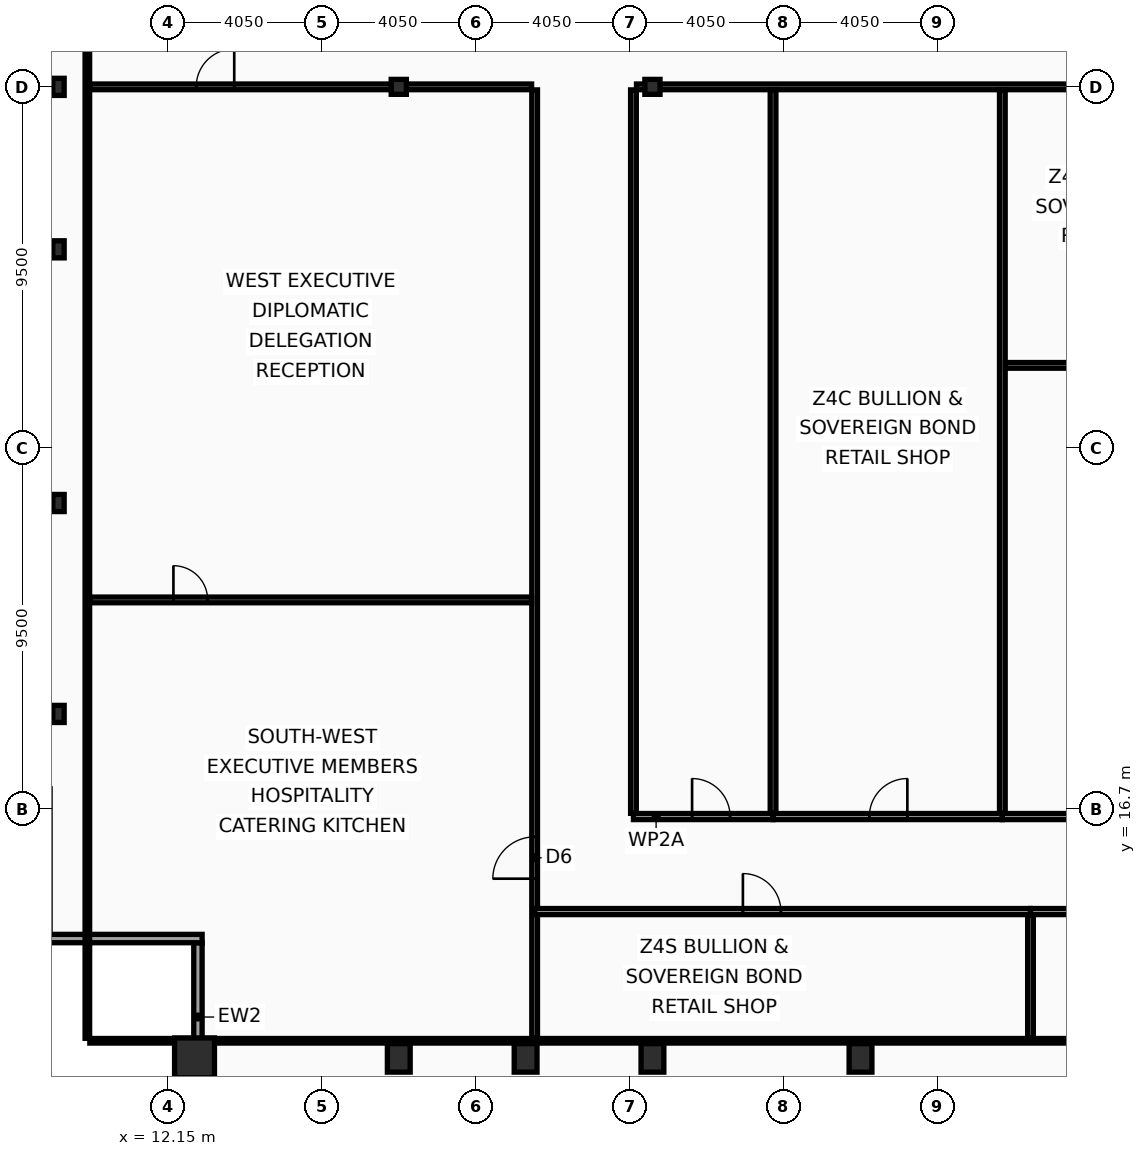
"""IFC4 building model, lengths in metres.
Left out: names, types, materials, properties, quantities, classifications, styles, units other than length and angle.
Written with IfcOpenShell. Run it as: python <this file> out.ifc"""

import sys

from ifc_helpers import new_model, si_unit, direction, frame, frame_2d, origin, origin_2d, place, context, subcontext, project, spatial, rectangle, hollow_rectangle, i_section, extrude, element, fill, save


model = new_model("IFC4")
c1 = context("Model", 3, precision=1e-05, world=origin(), true_north=direction((0.0, 1.0)))
c2 = subcontext(c1, "Body", "Model", "MODEL_VIEW")
j1 = project(units=[si_unit("LENGTHUNIT", "METRE"), si_unit("PLANEANGLEUNIT", "RADIAN")], contexts=[c1])
p1 = place(None, origin())
s1 = spatial("IfcSite", under=j1, at=p1, CompositionType="ELEMENT")
p2 = place(p1, origin())
s2 = spatial("IfcBuilding", under=s1, at=p2, CompositionType="ELEMENT")
p3 = place(p2, frame((0.0, 0.0, 273.4)))
s3 = spatial("IfcBuildingStorey", under=s2, at=p3, CompositionType="ELEMENT", Elevation=273.4)
p4 = place(p3, frame((12.85, 10.15, 0.0), z_axis=(0.0, 0.0, 1.0), x_axis=(1.0, 0.0, 0.0)))
e1 = element("IfcColumn", 1, at=p4, inside=s3, PredefinedType="COLUMN", context=c2, shape_type="SweptSolid", body=[
    extrude(hollow_rectangle(XDim=1.05, YDim=1.05, WallThickness=0.055, at=origin_2d()), origin(), (0.0, 0.0, 1.0), 3.6),
])
for number, where, z_axis, x_axis in (
    (2, (18.225, 10.15, 0.0), (0.0, 0.0, 1.0), (1.0, 0.0, 0.0)),
    (3, (21.562, 10.15, 0.0), (0.0, 0.0, 1.0), (1.0, 0.0, 0.0)),
    (4, (24.9, 10.15, 0.0), (0.0, 0.0, 1.0), (1.0, 0.0, 0.0)),
    (5, (30.375, 10.15, 0.0), (0.0, 0.0, 1.0), (1.0, 0.0, 0.0)),
):
    element("IfcColumn", number, at=place(p3, frame(where, z_axis=z_axis, x_axis=x_axis)), inside=s3, PredefinedType="COLUMN", context=c2, shape_type="SweptSolid", body=[
        extrude(hollow_rectangle(XDim=0.6, YDim=0.75, WallThickness=0.045, at=origin_2d()), origin(), (0.0, 0.0, 1.0), 3.6),
    ])
for number, where, z_axis, x_axis in (
    (6, (9.27, 19.2, 0.0), (0.0, 0.0, 1.0), (1.0, 0.0, 0.0)),
    (7, (9.27, 24.75, 0.0), (0.0, 0.0, 1.0), (1.0, 0.0, 0.0)),
    (8, (9.27, 31.425, 0.0), (0.0, 0.0, 1.0), (1.0, 0.0, 0.0)),
    (9, (9.27, 35.7, 0.0), (0.0, 0.0, 1.0), (1.0, 0.0, 0.0)),
):
    element("IfcColumn", number, at=place(p3, frame(where, z_axis=z_axis, x_axis=x_axis)), inside=s3, PredefinedType="COLUMN", context=c2, shape_type="SweptSolid", body=[
        extrude(i_section(OverallWidth=0.3, OverallDepth=0.45, WebThickness=0.014, FlangeThickness=0.026, at=origin_2d()), origin(), (0.0, 0.0, 1.0), 3.6),
    ])
for number, where, z_axis, x_axis in (
    (10, (18.225, 35.7, 0.0), (0.0, 0.0, 1.0), (1.0, 0.0, 0.0)),
    (11, (24.9, 35.7, 0.0), (0.0, 0.0, 1.0), (1.0, 0.0, 0.0)),
):
    element("IfcColumn", number, at=place(p3, frame(where, z_axis=z_axis, x_axis=x_axis)), inside=s3, PredefinedType="COLUMN", context=c2, shape_type="SweptSolid", body=[
        extrude(i_section(OverallWidth=0.399, OverallDepth=0.393, WebThickness=0.023, FlangeThickness=0.037, at=origin_2d()), origin(), (0.0, 0.0, 1.0), 3.6),
    ])
p5 = place(p3, frame((12.94, 9.27, 0.0), z_axis=(0.0, 0.0, 1.0), x_axis=(0.0, 1.0, 0.0)))
e12 = element("IfcWall", 12, at=p5, inside=s3, PredefinedType="SOLIDWALL", context=c2, shape_type="SweptSolid", body=[
    extrude(rectangle(XDim=3.91, YDim=0.22, at=frame_2d((1.955, 0.0))), origin(), (0.0, 0.0, 1.0), 2.88),
])
p6 = place(p3, frame((13.05, 13.29, 0.0), z_axis=(0.0, 0.0, 1.0), x_axis=(-1.0, 0.0, 0.0)))
e13 = element("IfcWall", 13, at=p6, inside=s3, PredefinedType="SOLIDWALL", context=c2, shape_type="SweptSolid", body=[
    extrude(rectangle(XDim=4.22, YDim=0.22, at=frame_2d((2.11, 0.0))), origin(), (0.0, 0.0, 1.0), 2.88),
])
p7 = place(p3, frame((21.8, 10.665, 0.0), z_axis=(0.0, 0.0, 1.0), x_axis=(0.0, 1.0, 0.0)))
e14 = element("IfcWall", 14, at=p7, inside=s3, PredefinedType="PARTITIONING", context=c2, shape_type="SweptSolid", body=[
    extrude(rectangle(XDim=24.955, YDim=0.15, at=frame_2d((12.478, 0.0))), origin(), (0.0, 0.0, 1.0), 3.03),
])
p8 = place(p7, frame((4.2, 0.0, 0.0)))
e15 = element("IfcOpeningElement", 15, at=p8, cuts=e14, PredefinedType="OPENING", context=c2, shape_type="SweptSolid", body=[
    extrude(rectangle(XDim=1.1, YDim=2.1, at=frame_2d((0.55, 1.05))), frame((0.0, 0.085, 0.0), z_axis=(0.0, -1.0, 0.0), x_axis=(1.0, 0.0, 0.0)), (0.0, 0.0, 1.0), 0.17),
])
p9 = place(p3, frame((10.095, 35.7, 0.0), z_axis=(0.0, 0.0, 1.0), x_axis=(1.0, 0.0, 0.0)))
e16 = element("IfcWall", 16, at=p9, inside=s3, PredefinedType="PARTITIONING", context=c2, shape_type="SweptSolid", body=[
    extrude(rectangle(XDim=11.625, YDim=0.15, at=frame_2d((5.812, 0.0))), origin(), (0.0, 0.0, 1.0), 2.78),
])
p10 = place(p9, frame((2.8, 0.0, 0.0)))
e17 = element("IfcOpeningElement", 17, at=p10, cuts=e16, PredefinedType="OPENING", context=c2, shape_type="SweptSolid", body=[
    extrude(rectangle(XDim=1.0, YDim=2.05, at=frame_2d((0.5, 1.025))), frame((0.0, 0.085, 0.0), z_axis=(0.0, -1.0, 0.0), x_axis=(1.0, 0.0, 0.0)), (0.0, 0.0, 1.0), 0.17),
])
p11 = place(p3, frame((10.095, 22.2, 0.0), z_axis=(0.0, 0.0, 1.0), x_axis=(1.0, 0.0, 0.0)))
e18 = element("IfcWall", 18, at=p11, inside=s3, PredefinedType="PARTITIONING", context=c2, shape_type="SweptSolid", body=[
    extrude(rectangle(XDim=11.625, YDim=0.15, at=frame_2d((5.812, 0.0))), origin(), (0.0, 0.0, 1.0), 2.78),
])
p12 = place(p11, frame((2.2, 0.0, 0.0)))
e19 = element("IfcOpeningElement", 19, at=p12, cuts=e18, PredefinedType="OPENING", context=c2, shape_type="SweptSolid", body=[
    extrude(rectangle(XDim=0.9, YDim=2.05, at=frame_2d((0.45, 1.025))), frame((0.0, 0.085, 0.0), z_axis=(0.0, -1.0, 0.0), x_axis=(1.0, 0.0, 0.0)), (0.0, 0.0, 1.0), 0.17),
])
p13 = place(p3, frame((24.4, 16.585, 0.0), z_axis=(0.0, 0.0, 1.0), x_axis=(0.0, 1.0, 0.0)))
e20 = element("IfcWall", 20, at=p13, inside=s3, PredefinedType="PARTITIONING", context=c2, shape_type="SweptSolid", body=[
    extrude(rectangle(XDim=19.035, YDim=0.15, at=frame_2d((9.518, 0.0))), origin(), (0.0, 0.0, 1.0), 2.78),
])
p14 = place(p3, frame((24.48, 35.7, 0.0), z_axis=(0.0, 0.0, 1.0), x_axis=(1.0, 0.0, 0.0)))
e21 = element("IfcWall", 21, at=p14, inside=s3, PredefinedType="PARTITIONING", context=c2, shape_type="SweptSolid", body=[
    extrude(rectangle(XDim=25.02, YDim=0.15, at=frame_2d((12.51, 0.0))), origin(), (0.0, 0.0, 1.0), 2.78),
])
p15 = place(p3, frame((24.4, 16.5, 0.0), z_axis=(0.0, 0.0, 1.0), x_axis=(1.0, 0.0, 0.0)))
e22 = element("IfcWall", 22, at=p15, inside=s3, PredefinedType="PARTITIONING", context=c2, shape_type="SweptSolid", body=[
    extrude(rectangle(XDim=3.674, YDim=0.16, at=frame_2d((1.837, 0.0))), origin(), (0.0, 0.0, 1.0), 2.78),
])
p16 = place(p15, frame((1.543, 0.0, 0.0)))
e23 = element("IfcOpeningElement", 23, at=p16, cuts=e22, PredefinedType="OPENING", context=c2, shape_type="SweptSolid", body=[
    extrude(rectangle(XDim=1.0, YDim=2.05, at=frame_2d((0.5, 1.025))), frame((0.0, 0.09, 0.0), z_axis=(0.0, -1.0, 0.0), x_axis=(1.0, 0.0, 0.0)), (0.0, 0.0, 1.0), 0.18),
])
p17 = place(p3, frame((28.074, 16.5, 0.0), z_axis=(0.0, 0.0, 1.0), x_axis=(1.0, 0.0, 0.0)))
e24 = element("IfcWall", 24, at=p17, inside=s3, PredefinedType="PARTITIONING", context=c2, shape_type="SweptSolid", body=[
    extrude(rectangle(XDim=6.033, YDim=0.16, at=frame_2d((3.017, 0.0))), origin(), (0.0, 0.0, 1.0), 2.78),
])
p18 = place(p17, frame((2.534, 0.0, 0.0)))
e25 = element("IfcOpeningElement", 25, at=p18, cuts=e24, PredefinedType="OPENING", context=c2, shape_type="SweptSolid", body=[
    extrude(rectangle(XDim=1.0, YDim=2.05, at=frame_2d((0.5, 1.025))), frame((0.0, 0.09, 0.0), z_axis=(0.0, -1.0, 0.0), x_axis=(1.0, 0.0, 0.0)), (0.0, 0.0, 1.0), 0.18),
])
p19 = place(p3, frame((28.074, 16.585, 0.0), z_axis=(0.0, 0.0, 1.0), x_axis=(0.0, 1.0, 0.0)))
e26 = element("IfcWall", 26, at=p19, inside=s3, PredefinedType="PARTITIONING", context=c2, shape_type="SweptSolid", body=[
    extrude(rectangle(XDim=19.035, YDim=0.15, at=frame_2d((9.518, 0.0))), origin(), (0.0, 0.0, 1.0), 3.03),
])
p20 = place(p3, frame((34.107, 16.5, 0.0), z_axis=(0.0, 0.0, 1.0), x_axis=(1.0, 0.0, 0.0)))
e27 = element("IfcWall", 27, at=p20, inside=s3, PredefinedType="PARTITIONING", context=c2, shape_type="SweptSolid", body=[
    extrude(rectangle(XDim=8.929, YDim=0.16, at=frame_2d((4.465, 0.0))), origin(), (0.0, 0.0, 1.0), 2.78),
])
p21 = place(p20, frame((3.75, 0.0, 0.0)))
e28 = element("IfcOpeningElement", 28, at=p21, cuts=e27, PredefinedType="OPENING", context=c2, shape_type="SweptSolid", body=[
    extrude(rectangle(XDim=1.0, YDim=2.05, at=frame_2d((0.5, 1.025))), frame((0.0, 0.09, 0.0), z_axis=(0.0, -1.0, 0.0), x_axis=(1.0, 0.0, 0.0)), (0.0, 0.0, 1.0), 0.18),
])
p22 = place(p3, frame((34.107, 16.585, 0.0), z_axis=(0.0, 0.0, 1.0), x_axis=(0.0, 1.0, 0.0)))
e29 = element("IfcWall", 29, at=p22, inside=s3, PredefinedType="PARTITIONING", context=c2, shape_type="SweptSolid", body=[
    extrude(rectangle(XDim=19.035, YDim=0.15, at=frame_2d((9.518, 0.0))), origin(), (0.0, 0.0, 1.0), 3.03),
])
p23 = place(p3, frame((34.187, 28.371, 0.0), z_axis=(0.0, 0.0, 1.0), x_axis=(1.0, 0.0, 0.0)))
e30 = element("IfcWall", 30, at=p23, inside=s3, PredefinedType="PARTITIONING", context=c2, shape_type="SweptSolid", body=[
    extrude(rectangle(XDim=8.769, YDim=0.15, at=frame_2d((4.385, 0.0))), origin(), (0.0, 0.0, 1.0), 2.78),
])
p24 = place(p23, frame((4.018, 0.0, 0.0)))
e31 = element("IfcOpeningElement", 31, at=p24, cuts=e30, PredefinedType="OPENING", context=c2, shape_type="SweptSolid", body=[
    extrude(rectangle(XDim=0.9, YDim=2.05, at=frame_2d((0.45, 1.025))), frame((0.0, 0.085, 0.0), z_axis=(0.0, -1.0, 0.0), x_axis=(1.0, 0.0, 0.0)), (0.0, 0.0, 1.0), 0.17),
])
p25 = place(p3, frame((21.8, 14.0, 0.0), z_axis=(0.0, 0.0, 1.0), x_axis=(1.0, 0.0, 0.0)))
e32 = element("IfcWall", 32, at=p25, inside=s3, PredefinedType="PARTITIONING", context=c2, shape_type="SweptSolid", body=[
    extrude(rectangle(XDim=13.048, YDim=0.16, at=frame_2d((6.524, 0.0))), origin(), (0.0, 0.0, 1.0), 2.78),
])
p26 = place(p25, frame((5.48, 0.0, 0.0)))
e33 = element("IfcOpeningElement", 33, at=p26, cuts=e32, PredefinedType="OPENING", context=c2, shape_type="SweptSolid", body=[
    extrude(rectangle(XDim=1.0, YDim=2.05, at=frame_2d((0.5, 1.025))), frame((0.0, 0.09, 0.0), z_axis=(0.0, -1.0, 0.0), x_axis=(1.0, 0.0, 0.0)), (0.0, 0.0, 1.0), 0.18),
])
p27 = place(p3, frame((34.848, 14.0, 0.0), z_axis=(0.0, 0.0, 1.0), x_axis=(1.0, 0.0, 0.0)))
e34 = element("IfcWall", 34, at=p27, inside=s3, PredefinedType="PARTITIONING", context=c2, shape_type="SweptSolid", body=[
    extrude(rectangle(XDim=7.576, YDim=0.16, at=frame_2d((3.788, 0.0))), origin(), (0.0, 0.0, 1.0), 2.78),
])
p28 = place(p27, frame((3.182, 0.0, 0.0)))
e35 = element("IfcOpeningElement", 35, at=p28, cuts=e34, PredefinedType="OPENING", context=c2, shape_type="SweptSolid", body=[
    extrude(rectangle(XDim=1.0, YDim=2.05, at=frame_2d((0.5, 1.025))), frame((0.0, 0.09, 0.0), z_axis=(0.0, -1.0, 0.0), x_axis=(1.0, 0.0, 0.0)), (0.0, 0.0, 1.0), 0.18),
])
p29 = place(p3, frame((34.848, 10.665, 0.0), z_axis=(0.0, 0.0, 1.0), x_axis=(0.0, 1.0, 0.0)))
e36 = element("IfcWall", 36, at=p29, inside=s3, PredefinedType="PARTITIONING", context=c2, shape_type="SweptSolid", body=[
    extrude(rectangle(XDim=3.25, YDim=0.15, at=frame_2d((1.625, 0.0))), origin(), (0.0, 0.0, 1.0), 3.44),
])
p30 = place(p3, frame((10.03, 10.665, 0.0), z_axis=(0.0, 0.0, 1.0), x_axis=(0.0, 1.0, 0.0)))
e37 = element("IfcWall", 37, at=p30, inside=s3, PredefinedType="PARTITIONING", context=c2, shape_type="SweptSolid", body=[
    extrude(rectangle(XDim=42.11, YDim=0.12, at=frame_2d((21.055, 0.0))), origin(), (0.0, 0.0, 1.0), 2.78),
])
p31 = place(p3, frame((10.095, 10.6, 0.0), z_axis=(0.0, 0.0, 1.0), x_axis=(1.0, 0.0, 0.0)))
e38 = element("IfcWall", 38, at=p31, inside=s3, PredefinedType="PARTITIONING", context=c2, shape_type="SweptSolid", body=[
    extrude(rectangle(XDim=52.71, YDim=0.12, at=frame_2d((26.355, 0.0))), origin(), (0.0, 0.0, 1.0), 2.78),
])
p32 = place(p8, origin())
e39 = element("IfcDoor", 39, at=p32, inside=s3, OperationType="SINGLE_SWING_LEFT", PredefinedType="DOOR", context=c2, shape_type="SweptSolid", body=[
    extrude(rectangle(XDim=1.1, YDim=2.1, at=frame_2d((0.55, 1.05))), frame((0.0, 0.025, 0.0), z_axis=(0.0, -1.0, 0.0), x_axis=(1.0, 0.0, 0.0)), (0.0, 0.0, 1.0), 0.05),
])
fill(e15, e39)
p33 = place(p10, origin())
e40 = element("IfcDoor", 40, at=p33, inside=s3, OperationType="SINGLE_SWING_RIGHT", PredefinedType="DOOR", context=c2, shape_type="SweptSolid", body=[
    extrude(rectangle(XDim=1.0, YDim=2.05, at=frame_2d((0.5, 1.025))), frame((0.0, 0.025, 0.0), z_axis=(0.0, -1.0, 0.0), x_axis=(1.0, 0.0, 0.0)), (0.0, 0.0, 1.0), 0.05),
])
fill(e17, e40)
p34 = place(p12, origin())
e41 = element("IfcDoor", 41, at=p34, inside=s3, OperationType="SINGLE_SWING_LEFT", PredefinedType="DOOR", context=c2, shape_type="SweptSolid", body=[
    extrude(rectangle(XDim=0.9, YDim=2.05, at=frame_2d((0.45, 1.025))), frame((0.0, 0.025, 0.0), z_axis=(0.0, -1.0, 0.0), x_axis=(1.0, 0.0, 0.0)), (0.0, 0.0, 1.0), 0.05),
])
fill(e19, e41)
p35 = place(p16, origin())
e42 = element("IfcDoor", 42, at=p35, inside=s3, OperationType="SINGLE_SWING_LEFT", PredefinedType="DOOR", context=c2, shape_type="SweptSolid", body=[
    extrude(rectangle(XDim=1.0, YDim=2.05, at=frame_2d((0.5, 1.025))), frame((0.0, 0.025, 0.0), z_axis=(0.0, -1.0, 0.0), x_axis=(1.0, 0.0, 0.0)), (0.0, 0.0, 1.0), 0.05),
])
fill(e23, e42)
p36 = place(p18, origin())
e43 = element("IfcDoor", 43, at=p36, inside=s3, OperationType="SINGLE_SWING_RIGHT", PredefinedType="DOOR", context=c2, shape_type="SweptSolid", body=[
    extrude(rectangle(XDim=1.0, YDim=2.05, at=frame_2d((0.5, 1.025))), frame((0.0, 0.025, 0.0), z_axis=(0.0, -1.0, 0.0), x_axis=(1.0, 0.0, 0.0)), (0.0, 0.0, 1.0), 0.05),
])
fill(e25, e43)
p37 = place(p26, origin())
e44 = element("IfcDoor", 44, at=p37, inside=s3, OperationType="SINGLE_SWING_LEFT", PredefinedType="DOOR", context=c2, shape_type="SweptSolid", body=[
    extrude(rectangle(XDim=1.0, YDim=2.05, at=frame_2d((0.5, 1.025))), frame((0.0, 0.025, 0.0), z_axis=(0.0, -1.0, 0.0), x_axis=(1.0, 0.0, 0.0)), (0.0, 0.0, 1.0), 0.05),
])
fill(e33, e44)
save(model, sys.argv[1])
